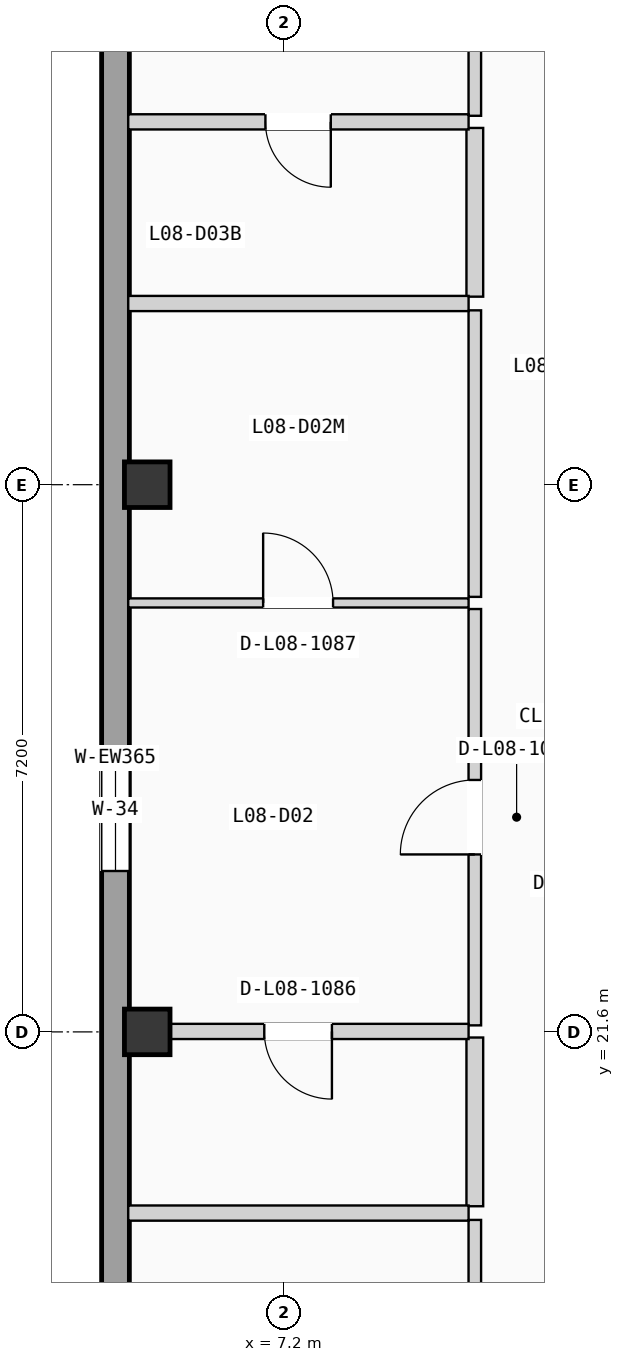
"""IFC4 building model, lengths in metres.
Left out: names, types, materials, properties, quantities, classifications, styles, units other than length and angle.
Written with IfcOpenShell. Run it as: python <this file> out.ifc"""

import sys

from ifc_helpers import new_model, si_unit, direction, frame, frame_2d, origin, origin_2d, place, context, subcontext, project, spatial, rectangle, extrude, element, fill, save


model = new_model("IFC4")
c1 = context("Model", 3, precision=1e-05, world=origin(), true_north=direction((0.0, 1.0)))
c2 = subcontext(c1, "Body", "Model", "MODEL_VIEW")
j1 = project(units=[si_unit("LENGTHUNIT", "METRE"), si_unit("PLANEANGLEUNIT", "RADIAN")], contexts=[c1])
p1 = place(None, origin())
s1 = spatial("IfcSite", under=j1, at=p1, CompositionType="ELEMENT")
p2 = place(p1, origin())
s2 = spatial("IfcBuilding", under=s1, at=p2, CompositionType="ELEMENT")
p3 = place(p2, frame((0.0, 0.0, 27.825)))
s3 = spatial("IfcBuildingStorey", under=s2, at=p3, CompositionType="ELEMENT", Elevation=27.825)
for number, where, z_axis, x_axis in (
    (1, (5.4, 21.6, 0.0), (0.0, 0.0, 1.0), (1.0, 0.0, 0.0)),
    (2, (5.4, 28.8, 0.0), (0.0, 0.0, 1.0), (1.0, 0.0, 0.0)),
):
    element("IfcColumn", number, at=place(p3, frame(where, z_axis=z_axis, x_axis=x_axis)), inside=s3, PredefinedType="COLUMN", context=c2, shape_type="SweptSolid", body=[
        extrude(rectangle(XDim=0.6, YDim=0.6, at=origin_2d()), origin(), (0.0, 0.0, 1.0), 2.85),
    ])
p4 = place(p3, frame((4.982, 0.365, 0.0), z_axis=(0.0, 0.0, 1.0), x_axis=(0.0, 1.0, 0.0)))
e3 = element("IfcWall", 3, at=p4, inside=s3, PredefinedType="SOLIDWALL", context=c2, shape_type="SweptSolid", body=[
    extrude(rectangle(XDim=49.67, YDim=0.365, at=frame_2d((24.835, 0.0))), origin(), (0.0, 0.0, 1.0), 2.55),
])
p5 = place(p4, frame((10.89, 0.0, 0.75)))
e4 = element("IfcOpeningElement", 4, at=p5, cuts=e3, PredefinedType="OPENING", context=c2, shape_type="SweptSolid", body=[
    extrude(rectangle(XDim=1.6, YDim=1.35, at=frame_2d((0.8, 0.675))), frame((0.0, 0.192, 0.0), z_axis=(0.0, -1.0, 0.0), x_axis=(1.0, 0.0, 0.0)), (0.0, 0.0, 1.0), 0.385),
])
p6 = place(p4, frame((16.076, 0.0, 0.665)))
e5 = element("IfcOpeningElement", 5, at=p6, cuts=e3, PredefinedType="OPENING", context=c2, shape_type="SweptSolid", body=[
    extrude(rectangle(XDim=1.6, YDim=1.5, at=frame_2d((0.8, 0.75))), frame((0.0, 0.192, 0.0), z_axis=(0.0, -1.0, 0.0), x_axis=(1.0, 0.0, 0.0)), (0.0, 0.0, 1.0), 0.385),
])
p7 = place(p4, frame((23.352, 0.0, 0.515)))
e6 = element("IfcOpeningElement", 6, at=p7, cuts=e3, PredefinedType="OPENING", context=c2, shape_type="SweptSolid", body=[
    extrude(rectangle(XDim=1.6, YDim=1.65, at=frame_2d((0.8, 0.825))), frame((0.0, 0.192, 0.0), z_axis=(0.0, -1.0, 0.0), x_axis=(1.0, 0.0, 0.0)), (0.0, 0.0, 1.0), 0.385),
])
p8 = place(p4, frame((36.73, 0.0, 0.85)))
e7 = element("IfcOpeningElement", 7, at=p8, cuts=e3, PredefinedType="OPENING", context=c2, shape_type="SweptSolid", body=[
    extrude(rectangle(XDim=0.95, YDim=1.2, at=frame_2d((0.475, 0.6))), frame((0.0, 0.192, 0.0), z_axis=(0.0, -1.0, 0.0), x_axis=(1.0, 0.0, 0.0)), (0.0, 0.0, 1.0), 0.385),
])
p9 = place(p4, frame((39.69, 0.0, 0.75)))
e8 = element("IfcOpeningElement", 8, at=p9, cuts=e3, PredefinedType="OPENING", context=c2, shape_type="SweptSolid", body=[
    extrude(rectangle(XDim=1.72, YDim=1.2, at=frame_2d((0.86, 0.6))), frame((0.0, 0.192, 0.0), z_axis=(0.0, -1.0, 0.0), x_axis=(1.0, 0.0, 0.0)), (0.0, 0.0, 1.0), 0.385),
])
p10 = place(p3, frame((9.71, 15.356, 0.0), z_axis=(0.0, 0.0, 1.0), x_axis=(0.0, 1.0, 0.0)))
e9 = element("IfcWall", 9, at=p10, inside=s3, PredefinedType="PARTITIONING", context=c2, shape_type="SweptSolid", body=[
    extrude(rectangle(XDim=3.77, YDim=0.165, at=frame_2d((1.885, 0.0))), origin(), (0.0, 0.0, 1.0), 2.39),
])
p11 = place(p3, frame((9.71, 19.306, 0.0), z_axis=(0.0, 0.0, 1.0), x_axis=(0.0, 1.0, 0.0)))
e10 = element("IfcWall", 10, at=p11, inside=s3, PredefinedType="PLUMBINGWALL", context=c2, shape_type="SweptSolid", body=[
    extrude(rectangle(XDim=2.22, YDim=0.22, at=frame_2d((1.11, 0.0))), origin(), (0.0, 0.0, 1.0), 2.39),
])
p12 = place(p3, frame((9.71, 21.686, 0.0), z_axis=(0.0, 0.0, 1.0), x_axis=(0.0, 1.0, 0.0)))
e11 = element("IfcWall", 11, at=p12, inside=s3, PredefinedType="PARTITIONING", context=c2, shape_type="SweptSolid", body=[
    extrude(rectangle(XDim=5.478, YDim=0.165, at=frame_2d((2.739, 0.0))), origin(), (0.0, 0.0, 1.0), 2.39),
])
p13 = place(p12, frame((2.249, 0.0, 0.0)))
e12 = element("IfcOpeningElement", 12, at=p13, cuts=e11, PredefinedType="OPENING", context=c2, shape_type="SweptSolid", body=[
    extrude(rectangle(XDim=0.98, YDim=2.08, at=frame_2d((0.49, 1.04))), frame((0.0, 0.093, 0.0), z_axis=(0.0, -1.0, 0.0), x_axis=(1.0, 0.0, 0.0)), (0.0, 0.0, 1.0), 0.185),
])
p14 = place(p3, frame((9.71, 27.324, 0.0), z_axis=(0.0, 0.0, 1.0), x_axis=(0.0, 1.0, 0.0)))
e13 = element("IfcWall", 13, at=p14, inside=s3, PredefinedType="PARTITIONING", context=c2, shape_type="SweptSolid", body=[
    extrude(rectangle(XDim=3.77, YDim=0.165, at=frame_2d((1.885, 0.0))), origin(), (0.0, 0.0, 1.0), 2.39),
])
p15 = place(p3, frame((9.71, 31.274, 0.0), z_axis=(0.0, 0.0, 1.0), x_axis=(0.0, 1.0, 0.0)))
e14 = element("IfcWall", 14, at=p15, inside=s3, PredefinedType="PLUMBINGWALL", context=c2, shape_type="SweptSolid", body=[
    extrude(rectangle(XDim=2.22, YDim=0.22, at=frame_2d((1.11, 0.0))), origin(), (0.0, 0.0, 1.0), 2.39),
])
p16 = place(p3, frame((9.71, 33.654, 0.0), z_axis=(0.0, 0.0, 1.0), x_axis=(0.0, 1.0, 0.0)))
e15 = element("IfcWall", 15, at=p16, inside=s3, PredefinedType="PARTITIONING", context=c2, shape_type="SweptSolid", body=[
    extrude(rectangle(XDim=5.216, YDim=0.165, at=frame_2d((2.608, 0.0))), origin(), (0.0, 0.0, 1.0), 2.39),
])
p17 = place(p16, frame((2.118, 0.0, 0.0)))
e16 = element("IfcOpeningElement", 16, at=p17, cuts=e15, PredefinedType="OPENING", context=c2, shape_type="SweptSolid", body=[
    extrude(rectangle(XDim=0.98, YDim=2.08, at=frame_2d((0.49, 1.04))), frame((0.0, 0.093, 0.0), z_axis=(0.0, -1.0, 0.0), x_axis=(1.0, 0.0, 0.0)), (0.0, 0.0, 1.0), 0.185),
])
p18 = place(p3, frame((5.15, 19.216, 0.0), z_axis=(0.0, 0.0, 1.0), x_axis=(1.0, 0.0, 0.0)))
e17 = element("IfcWall", 17, at=p18, inside=s3, PredefinedType="PLUMBINGWALL", context=c2, shape_type="SweptSolid", body=[
    extrude(rectangle(XDim=4.478, YDim=0.2, at=frame_2d((2.239, 0.0))), origin(), (0.0, 0.0, 1.0), 2.39),
])
p19 = place(p3, frame((5.15, 21.606, 0.0), z_axis=(0.0, 0.0, 1.0), x_axis=(1.0, 0.0, 0.0)))
e18 = element("IfcWall", 18, at=p19, inside=s3, PredefinedType="PLUMBINGWALL", context=c2, shape_type="SweptSolid", body=[
    extrude(rectangle(XDim=4.478, YDim=0.2, at=frame_2d((2.239, 0.0))), origin(), (0.0, 0.0, 1.0), 2.12),
])
p20 = place(p19, frame((1.79, 0.0, 0.0)))
e19 = element("IfcOpeningElement", 19, at=p20, cuts=e18, PredefinedType="OPENING", context=c2, shape_type="SweptSolid", body=[
    extrude(rectangle(XDim=0.89, YDim=2.03, at=frame_2d((0.445, 1.015))), frame((0.0, 0.11, 0.0), z_axis=(0.0, -1.0, 0.0), x_axis=(1.0, 0.0, 0.0)), (0.0, 0.0, 1.0), 0.22),
])
p21 = place(p3, frame((5.15, 27.244, 0.0), z_axis=(0.0, 0.0, 1.0), x_axis=(1.0, 0.0, 0.0)))
e20 = element("IfcWall", 20, at=p21, inside=s3, PredefinedType="PARTITIONING", context=c2, shape_type="SweptSolid", body=[
    extrude(rectangle(XDim=4.478, YDim=0.12, at=frame_2d((2.239, 0.0))), origin(), (0.0, 0.0, 1.0), 2.39),
])
p22 = place(p21, frame((1.775, 0.0, 0.0)))
e21 = element("IfcOpeningElement", 21, at=p22, cuts=e20, PredefinedType="OPENING", context=c2, shape_type="SweptSolid", body=[
    extrude(rectangle(XDim=0.92, YDim=2.02, at=frame_2d((0.46, 1.01))), frame((0.0, 0.07, 0.0), z_axis=(0.0, -1.0, 0.0), x_axis=(1.0, 0.0, 0.0)), (0.0, 0.0, 1.0), 0.14),
])
p23 = place(p3, frame((5.15, 31.184, 0.0), z_axis=(0.0, 0.0, 1.0), x_axis=(1.0, 0.0, 0.0)))
e22 = element("IfcWall", 22, at=p23, inside=s3, PredefinedType="PLUMBINGWALL", context=c2, shape_type="SweptSolid", body=[
    extrude(rectangle(XDim=4.478, YDim=0.2, at=frame_2d((2.239, 0.0))), origin(), (0.0, 0.0, 1.0), 2.39),
])
p24 = place(p3, frame((5.15, 33.574, 0.0), z_axis=(0.0, 0.0, 1.0), x_axis=(1.0, 0.0, 0.0)))
e23 = element("IfcWall", 23, at=p24, inside=s3, PredefinedType="PLUMBINGWALL", context=c2, shape_type="SweptSolid", body=[
    extrude(rectangle(XDim=4.478, YDim=0.2, at=frame_2d((2.239, 0.0))), origin(), (0.0, 0.0, 1.0), 2.39),
])
p25 = place(p24, frame((1.805, 0.0, 0.0)))
e24 = element("IfcOpeningElement", 24, at=p25, cuts=e23, PredefinedType="OPENING", context=c2, shape_type="SweptSolid", body=[
    extrude(rectangle(XDim=0.86, YDim=2.0, at=frame_2d((0.43, 1.0))), frame((0.0, 0.11, 0.0), z_axis=(0.0, -1.0, 0.0), x_axis=(1.0, 0.0, 0.0)), (0.0, 0.0, 1.0), 0.22),
])
p26 = place(p7, origin())
e25 = element("IfcWindow", 25, at=p26, inside=s3, PartitioningType="DOUBLE_PANEL_VERTICAL", PredefinedType="WINDOW", context=c2, shape_type="SweptSolid", body=[
    extrude(rectangle(XDim=1.6, YDim=1.65, at=frame_2d((0.8, 0.825))), frame((0.0, 0.03, 0.0), z_axis=(0.0, -1.0, 0.0), x_axis=(1.0, 0.0, 0.0)), (0.0, 0.0, 1.0), 0.06),
])
fill(e6, e25)
p27 = place(p13, origin())
e26 = element("IfcDoor", 26, at=p27, inside=s3, OperationType="SINGLE_SWING_LEFT", PredefinedType="DOOR", context=c2, shape_type="SweptSolid", body=[
    extrude(rectangle(XDim=0.98, YDim=2.08, at=frame_2d((0.49, 1.04))), frame((0.0, 0.025, 0.0), z_axis=(0.0, -1.0, 0.0), x_axis=(1.0, 0.0, 0.0)), (0.0, 0.0, 1.0), 0.05),
])
fill(e12, e26)
p28 = place(p20, frame((0.89, 0.0, 0.0), z_axis=(0.0, 0.0, 1.0), x_axis=(-1.0, 0.0, 0.0)))
e27 = element("IfcDoor", 27, at=p28, inside=s3, OperationType="SINGLE_SWING_RIGHT", PredefinedType="DOOR", context=c2, shape_type="SweptSolid", body=[
    extrude(rectangle(XDim=0.89, YDim=2.03, at=frame_2d((0.445, 1.015))), frame((0.0, 0.025, 0.0), z_axis=(0.0, -1.0, 0.0), x_axis=(1.0, 0.0, 0.0)), (0.0, 0.0, 1.0), 0.05),
])
fill(e19, e27)
p29 = place(p22, origin())
e28 = element("IfcDoor", 28, at=p29, inside=s3, OperationType="SINGLE_SWING_LEFT", PredefinedType="DOOR", context=c2, shape_type="SweptSolid", body=[
    extrude(rectangle(XDim=0.92, YDim=2.02, at=frame_2d((0.46, 1.01))), frame((0.0, 0.025, 0.0), z_axis=(0.0, -1.0, 0.0), x_axis=(1.0, 0.0, 0.0)), (0.0, 0.0, 1.0), 0.05),
])
fill(e21, e28)
p30 = place(p25, frame((0.86, 0.0, 0.0), z_axis=(0.0, 0.0, 1.0), x_axis=(-1.0, 0.0, 0.0)))
e29 = element("IfcDoor", 29, at=p30, inside=s3, OperationType="SINGLE_SWING_RIGHT", PredefinedType="DOOR", context=c2, shape_type="SweptSolid", body=[
    extrude(rectangle(XDim=0.86, YDim=2.0, at=frame_2d((0.43, 1.0))), frame((0.0, 0.025, 0.0), z_axis=(0.0, -1.0, 0.0), x_axis=(1.0, 0.0, 0.0)), (0.0, 0.0, 1.0), 0.05),
])
fill(e24, e29)
save(model, sys.argv[1])
